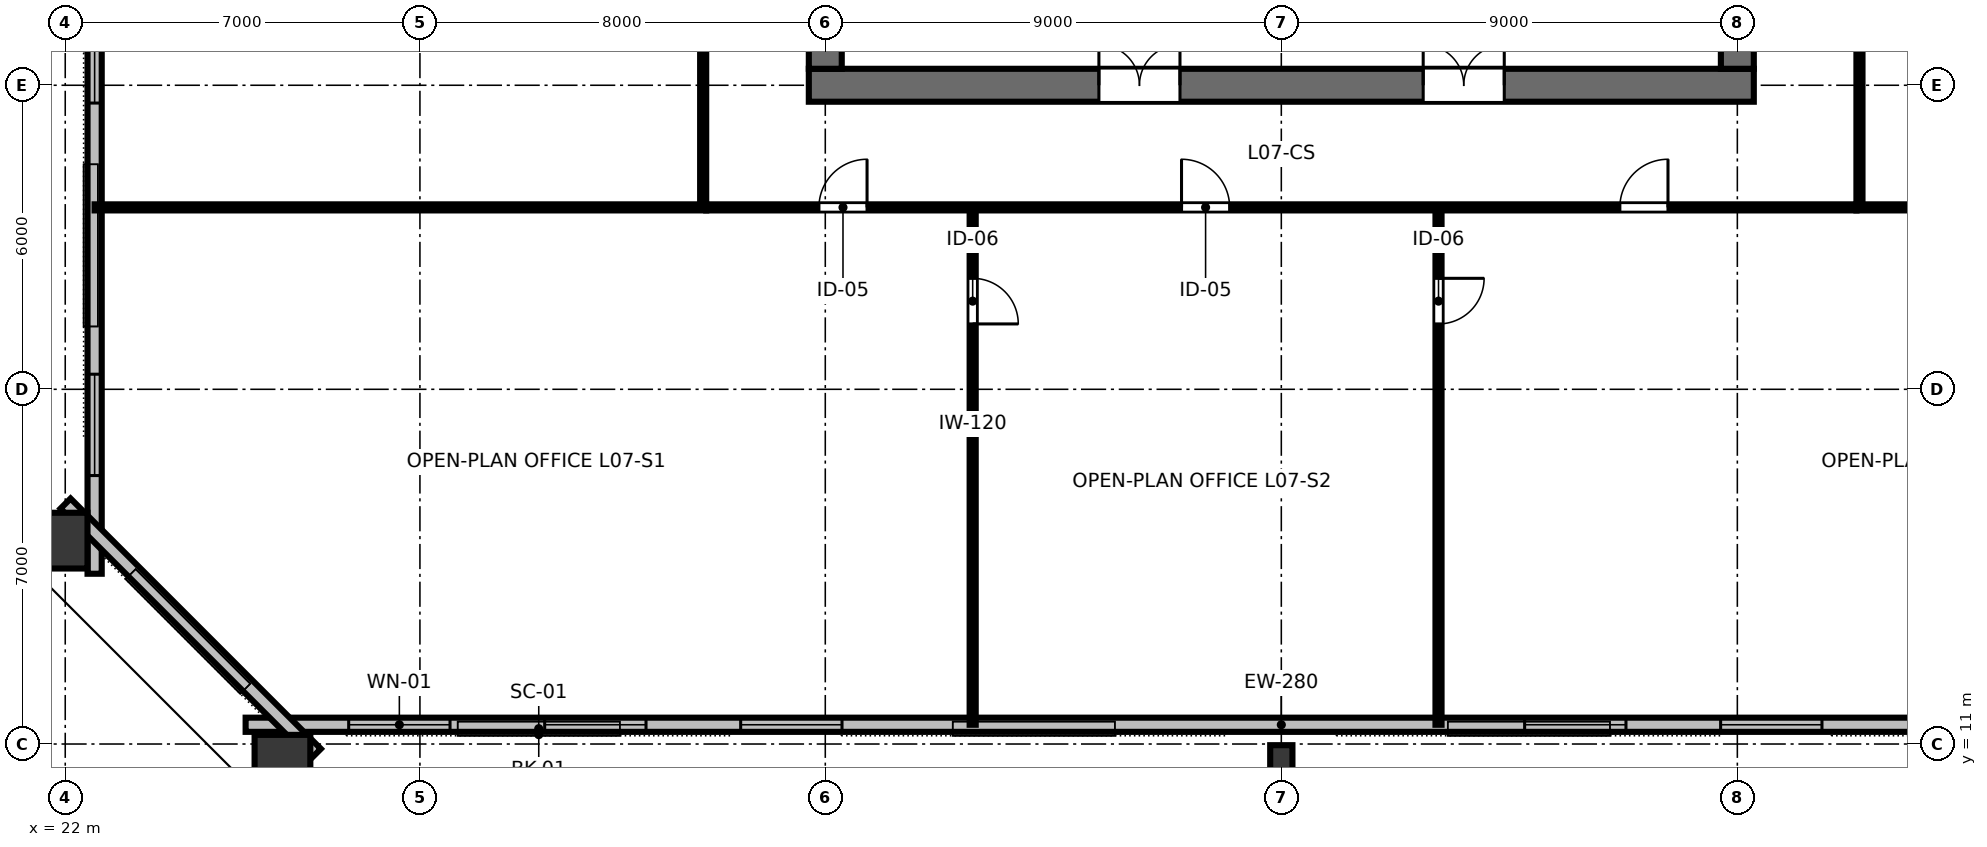
"""IFC4 building model, lengths in metres.
Left out: names, types, materials, properties, quantities, classifications, styles, units other than length and angle.
Written with IfcOpenShell. Run it as: python <this file> out.ifc"""

import sys

from ifc_helpers import new_model, si_unit, direction, frame, frame_2d, origin, origin_2d, place, context, subcontext, project, spatial, rectangle, hollow_rectangle, i_section, extrude, element, fill, save


model = new_model("IFC4")
c1 = context("Model", 3, precision=1e-05, world=origin(), true_north=direction((0.0, 1.0)))
c2 = subcontext(c1, "Body", "Model", "MODEL_VIEW")
j1 = project(units=[si_unit("LENGTHUNIT", "METRE"), si_unit("PLANEANGLEUNIT", "RADIAN")], contexts=[c1])
p1 = place(None, origin())
s1 = spatial("IfcSite", under=j1, at=p1, CompositionType="ELEMENT")
p2 = place(p1, origin())
s2 = spatial("IfcBuilding", under=s1, at=p2, CompositionType="ELEMENT")
p3 = place(p2, frame((0.0, 0.0, 31.6)))
s3 = spatial("IfcBuildingStorey", under=s2, at=p3, CompositionType="ELEMENT", Elevation=31.6)
p4 = place(p3, frame((36.675, 24.0, 0.0), z_axis=(0.0, 0.0, 1.0), x_axis=(1.0, 0.0, 0.0)))
e1 = element("IfcWall", 1, at=p4, inside=s3, PredefinedType="SHEAR", context=c2, shape_type="SweptSolid", body=[
    extrude(rectangle(XDim=18.65, YDim=0.65, at=frame_2d((9.325, 0.0))), origin(), (0.0, 0.0, 1.0), 3.36),
])
p5 = place(p4, frame((5.725, 0.0, 0.0)))
e2 = element("IfcOpeningElement", 2, at=p5, cuts=e1, PredefinedType="OPENING", context=c2, shape_type="SweptSolid", body=[
    extrude(rectangle(XDim=1.6, YDim=2.15, at=frame_2d((0.8, 1.075))), frame((0.0, 0.335, 0.0), z_axis=(0.0, -1.0, 0.0), x_axis=(1.0, 0.0, 0.0)), (0.0, 0.0, 1.0), 0.67),
])
p6 = place(p4, frame((12.125, 0.0, 0.0)))
e3 = element("IfcOpeningElement", 3, at=p6, cuts=e1, PredefinedType="OPENING", context=c2, shape_type="SweptSolid", body=[
    extrude(rectangle(XDim=1.6, YDim=2.15, at=frame_2d((0.8, 1.075))), frame((0.0, 0.335, 0.0), z_axis=(0.0, -1.0, 0.0), x_axis=(1.0, 0.0, 0.0)), (0.0, 0.0, 1.0), 0.67),
])
p7 = place(p3, frame((37.0, 24.325, 0.0), z_axis=(0.0, 0.0, 1.0), x_axis=(0.0, 1.0, 0.0)))
e4 = element("IfcWall", 4, at=p7, inside=s3, PredefinedType="SHEAR", context=c2, shape_type="SweptSolid", body=[
    extrude(rectangle(XDim=15.35, YDim=0.65, at=frame_2d((7.675, 0.0))), origin(), (0.0, 0.0, 1.0), 3.36),
])
p8 = place(p7, frame((5.2, 0.0, 0.0)))
e5 = element("IfcOpeningElement", 5, at=p8, cuts=e4, PredefinedType="OPENING", context=c2, shape_type="SweptSolid", body=[
    extrude(rectangle(XDim=1.15, YDim=2.15, at=frame_2d((0.575, 1.075))), frame((0.0, 0.335, 0.0), z_axis=(0.0, -1.0, 0.0), x_axis=(1.0, 0.0, 0.0)), (0.0, 0.0, 1.0), 0.67),
])
p9 = place(p3, frame((55.0, 24.325, 0.0), z_axis=(0.0, 0.0, 1.0), x_axis=(0.0, 1.0, 0.0)))
e6 = element("IfcWall", 6, at=p9, inside=s3, PredefinedType="SHEAR", context=c2, shape_type="SweptSolid", body=[
    extrude(rectangle(XDim=15.35, YDim=0.65, at=frame_2d((7.675, 0.0))), origin(), (0.0, 0.0, 1.0), 3.36),
])
p10 = place(p9, frame((5.2, 0.0, 0.0)))
e7 = element("IfcOpeningElement", 7, at=p10, cuts=e6, PredefinedType="OPENING", context=c2, shape_type="SweptSolid", body=[
    extrude(rectangle(XDim=1.15, YDim=2.15, at=frame_2d((0.575, 1.075))), frame((0.0, 0.335, 0.0), z_axis=(0.0, -1.0, 0.0), x_axis=(1.0, 0.0, 0.0)), (0.0, 0.0, 1.0), 0.67),
])
p11 = place(p3, frame((26.287, 10.531, 0.0), z_axis=(0.0, 0.0, 1.0), x_axis=(1.0, 0.0, 0.0)))
e8 = element("IfcColumn", 8, at=p11, inside=s3, PredefinedType="COLUMN", context=c2, shape_type="SweptSolid", body=[
    extrude(hollow_rectangle(XDim=1.1, YDim=1.3, WallThickness=0.07, at=origin_2d()), origin(), (0.0, 0.0, 1.0), 3.148),
])
p12 = place(p3, frame((46.0, 10.72, 0.0), z_axis=(0.0, 0.0, 1.0), x_axis=(1.0, 0.0, 0.0)))
e9 = element("IfcColumn", 9, at=p12, inside=s3, PredefinedType="COLUMN", context=c2, shape_type="SweptSolid", body=[
    extrude(i_section(OverallWidth=0.439, OverallDepth=0.514, WebThickness=0.06, FlangeThickness=0.097, FilletRadius=0.025, at=origin_2d()), origin(), (0.0, 0.0, 1.0), 3.148),
])
p13 = place(p3, frame((21.789, 15.013, 0.0), z_axis=(0.0, 0.0, 1.0), x_axis=(0.0, 1.0, 0.0)))
e10 = element("IfcColumn", 10, at=p13, inside=s3, PredefinedType="COLUMN", context=c2, shape_type="SweptSolid", body=[
    extrude(hollow_rectangle(XDim=1.1, YDim=1.3, WallThickness=0.07, at=origin_2d()), origin(), (0.0, 0.0, 1.0), 3.148),
])
p14 = place(p3, frame((25.56, 11.38, 0.0), z_axis=(0.0, 0.0, 1.0), x_axis=(1.0, 0.0, 0.0)))
e11 = element("IfcWall", 11, at=p14, inside=s3, PredefinedType="STANDARD", context=c2, shape_type="SweptSolid", body=[
    extrude(rectangle(XDim=40.88, YDim=0.28, at=frame_2d((20.44, 0.0))), origin(), (0.0, 0.0, 1.0), 3.15),
])
p15 = place(p14, frame((2.034, 0.0, 0.8)))
e12 = element("IfcOpeningElement", 12, at=p15, cuts=e11, PredefinedType="OPENING", context=c2, shape_type="SweptSolid", body=[
    extrude(rectangle(XDim=2.0, YDim=1.95, at=frame_2d((1.0, 0.975))), frame((0.0, 0.15, 0.0), z_axis=(0.0, -1.0, 0.0), x_axis=(1.0, 0.0, 0.0)), (0.0, 0.0, 1.0), 0.3),
])
p16 = place(p14, frame((5.902, 0.0, 0.8)))
e13 = element("IfcOpeningElement", 13, at=p16, cuts=e11, PredefinedType="OPENING", context=c2, shape_type="SweptSolid", body=[
    extrude(rectangle(XDim=2.0, YDim=1.95, at=frame_2d((1.0, 0.975))), frame((0.0, 0.15, 0.0), z_axis=(0.0, -1.0, 0.0), x_axis=(1.0, 0.0, 0.0)), (0.0, 0.0, 1.0), 0.3),
])
p17 = place(p14, frame((9.77, 0.0, 0.8)))
e14 = element("IfcOpeningElement", 14, at=p17, cuts=e11, PredefinedType="OPENING", context=c2, shape_type="SweptSolid", body=[
    extrude(rectangle(XDim=2.0, YDim=1.95, at=frame_2d((1.0, 0.975))), frame((0.0, 0.15, 0.0), z_axis=(0.0, -1.0, 0.0), x_axis=(1.0, 0.0, 0.0)), (0.0, 0.0, 1.0), 0.3),
])
p18 = place(p14, frame((25.242, 0.0, 0.8)))
e15 = element("IfcOpeningElement", 15, at=p18, cuts=e11, PredefinedType="OPENING", context=c2, shape_type="SweptSolid", body=[
    extrude(rectangle(XDim=2.0, YDim=1.95, at=frame_2d((1.0, 0.975))), frame((0.0, 0.15, 0.0), z_axis=(0.0, -1.0, 0.0), x_axis=(1.0, 0.0, 0.0)), (0.0, 0.0, 1.0), 0.3),
])
p19 = place(p14, frame((29.11, 0.0, 0.8)))
e16 = element("IfcOpeningElement", 16, at=p19, cuts=e11, PredefinedType="OPENING", context=c2, shape_type="SweptSolid", body=[
    extrude(rectangle(XDim=2.0, YDim=1.95, at=frame_2d((1.0, 0.975))), frame((0.0, 0.15, 0.0), z_axis=(0.0, -1.0, 0.0), x_axis=(1.0, 0.0, 0.0)), (0.0, 0.0, 1.0), 0.3),
])
p20 = place(p14, frame((32.978, 0.0, 0.8)))
e17 = element("IfcOpeningElement", 17, at=p20, cuts=e11, PredefinedType="OPENING", context=c2, shape_type="SweptSolid", body=[
    extrude(rectangle(XDim=2.0, YDim=1.95, at=frame_2d((1.0, 0.975))), frame((0.0, 0.15, 0.0), z_axis=(0.0, -1.0, 0.0), x_axis=(1.0, 0.0, 0.0)), (0.0, 0.0, 1.0), 0.3),
])
p21 = place(p14, frame((36.846, 0.0, 0.8)))
e18 = element("IfcOpeningElement", 18, at=p21, cuts=e11, PredefinedType="OPENING", context=c2, shape_type="SweptSolid", body=[
    extrude(rectangle(XDim=2.0, YDim=1.95, at=frame_2d((1.0, 0.975))), frame((0.0, 0.15, 0.0), z_axis=(0.0, -1.0, 0.0), x_axis=(1.0, 0.0, 0.0)), (0.0, 0.0, 1.0), 0.3),
])
p22 = place(p3, frame((22.58, 49.64, 0.0), z_axis=(0.0, 0.0, 1.0), x_axis=(0.0, -1.0, 0.0)))
e19 = element("IfcWall", 19, at=p22, inside=s3, PredefinedType="STANDARD", context=c2, shape_type="SweptSolid", body=[
    extrude(rectangle(XDim=35.28, YDim=0.28, at=frame_2d((17.64, 0.0))), origin(), (0.0, 0.0, 1.0), 3.15),
])
p23 = place(p22, frame((1.938, 0.0, 0.8)))
e20 = element("IfcOpeningElement", 20, at=p23, cuts=e19, PredefinedType="OPENING", context=c2, shape_type="SweptSolid", body=[
    extrude(rectangle(XDim=2.0, YDim=1.95, at=frame_2d((1.0, 0.975))), frame((0.0, 0.15, 0.0), z_axis=(0.0, -1.0, 0.0), x_axis=(1.0, 0.0, 0.0)), (0.0, 0.0, 1.0), 0.3),
])
p24 = place(p22, frame((9.289, 0.0, 0.8)))
e21 = element("IfcOpeningElement", 21, at=p24, cuts=e19, PredefinedType="OPENING", context=c2, shape_type="SweptSolid", body=[
    extrude(rectangle(XDim=2.0, YDim=1.95, at=frame_2d((1.0, 0.975))), frame((0.0, 0.15, 0.0), z_axis=(0.0, -1.0, 0.0), x_axis=(1.0, 0.0, 0.0)), (0.0, 0.0, 1.0), 0.3),
])
p25 = place(p22, frame((12.964, 0.0, 0.8)))
e22 = element("IfcOpeningElement", 22, at=p25, cuts=e19, PredefinedType="OPENING", context=c2, shape_type="SweptSolid", body=[
    extrude(rectangle(XDim=2.0, YDim=1.95, at=frame_2d((1.0, 0.975))), frame((0.0, 0.15, 0.0), z_axis=(0.0, -1.0, 0.0), x_axis=(1.0, 0.0, 0.0)), (0.0, 0.0, 1.0), 0.3),
])
p26 = place(p22, frame((23.991, 0.0, 0.8)))
e23 = element("IfcOpeningElement", 23, at=p26, cuts=e19, PredefinedType="OPENING", context=c2, shape_type="SweptSolid", body=[
    extrude(rectangle(XDim=2.0, YDim=1.95, at=frame_2d((1.0, 0.975))), frame((0.0, 0.15, 0.0), z_axis=(0.0, -1.0, 0.0), x_axis=(1.0, 0.0, 0.0)), (0.0, 0.0, 1.0), 0.3),
])
p27 = place(p22, frame((31.342, 0.0, 0.8)))
e24 = element("IfcOpeningElement", 24, at=p27, cuts=e19, PredefinedType="OPENING", context=c2, shape_type="SweptSolid", body=[
    extrude(rectangle(XDim=2.0, YDim=1.95, at=frame_2d((1.0, 0.975))), frame((0.0, 0.15, 0.0), z_axis=(0.0, -1.0, 0.0), x_axis=(1.0, 0.0, 0.0)), (0.0, 0.0, 1.0), 0.3),
])
p28 = place(p3, frame((22.006, 15.746, 0.0), z_axis=(0.0, 0.0, 1.0), x_axis=(0.707106781187, -0.707106781187, 0.0)))
e25 = element("IfcWall", 25, at=p28, inside=s3, PredefinedType="STANDARD", context=c2, shape_type="SweptSolid", body=[
    extrude(rectangle(XDim=6.985, YDim=0.28, at=frame_2d((3.493, 0.0))), origin(), (0.0, 0.0, 1.0), 3.15),
])
p29 = place(p3, frame((39.909, 21.59, 0.0), z_axis=(0.0, 0.0, 1.0), x_axis=(0.0, -1.0, 0.0)))
e26 = element("IfcWall", 26, at=p29, inside=s3, PredefinedType="PARTITIONING", context=c2, shape_type="SweptSolid", body=[
    extrude(rectangle(XDim=10.21, YDim=0.12, at=frame_2d((5.105, 0.0))), origin(), (0.0, 0.0, 1.0), 2.43),
])
p30 = place(p29, frame((1.4, 0.0, 0.0)))
e27 = element("IfcOpeningElement", 27, at=p30, cuts=e26, PredefinedType="OPENING", context=c2, shape_type="SweptSolid", body=[
    extrude(rectangle(XDim=0.9, YDim=2.15, at=frame_2d((0.45, 1.075))), frame((0.0, 0.07, 0.0), z_axis=(0.0, -1.0, 0.0), x_axis=(1.0, 0.0, 0.0)), (0.0, 0.0, 1.0), 0.14),
])
p31 = place(p3, frame((49.102, 21.59, 0.0), z_axis=(0.0, 0.0, 1.0), x_axis=(0.0, -1.0, 0.0)))
e28 = element("IfcWall", 28, at=p31, inside=s3, PredefinedType="PARTITIONING", context=c2, shape_type="SweptSolid", body=[
    extrude(rectangle(XDim=10.21, YDim=0.12, at=frame_2d((5.105, 0.0))), origin(), (0.0, 0.0, 1.0), 2.43),
])
p32 = place(p31, frame((1.4, 0.0, 0.0)))
e29 = element("IfcOpeningElement", 29, at=p32, cuts=e28, PredefinedType="OPENING", context=c2, shape_type="SweptSolid", body=[
    extrude(rectangle(XDim=0.9, YDim=2.15, at=frame_2d((0.45, 1.075))), frame((0.0, 0.07, 0.0), z_axis=(0.0, -1.0, 0.0), x_axis=(1.0, 0.0, 0.0)), (0.0, 0.0, 1.0), 0.14),
])
p33 = place(p3, frame((34.65, 21.59, 0.0), z_axis=(0.0, 0.0, 1.0), x_axis=(1.0, 0.0, 0.0)))
e30 = element("IfcWall", 30, at=p33, inside=s3, PredefinedType="PARTITIONING", context=c2, shape_type="SweptSolid", body=[
    extrude(rectangle(XDim=22.7, YDim=0.12, at=frame_2d((11.35, 0.0))), origin(), (0.0, 0.0, 1.0), 2.43),
])
p34 = place(p33, frame((2.224, 0.0, 0.0)))
e31 = element("IfcOpeningElement", 31, at=p34, cuts=e30, PredefinedType="OPENING", context=c2, shape_type="SweptSolid", body=[
    extrude(rectangle(XDim=0.95, YDim=2.15, at=frame_2d((0.475, 1.075))), frame((0.0, 0.07, 0.0), z_axis=(0.0, -1.0, 0.0), x_axis=(1.0, 0.0, 0.0)), (0.0, 0.0, 1.0), 0.14),
])
p35 = place(p33, frame((9.381, 0.0, 0.0)))
e32 = element("IfcOpeningElement", 32, at=p35, cuts=e30, PredefinedType="OPENING", context=c2, shape_type="SweptSolid", body=[
    extrude(rectangle(XDim=0.95, YDim=2.15, at=frame_2d((0.475, 1.075))), frame((0.0, 0.07, 0.0), z_axis=(0.0, -1.0, 0.0), x_axis=(1.0, 0.0, 0.0)), (0.0, 0.0, 1.0), 0.14),
])
p36 = place(p33, frame((18.031, 0.0, 0.0)))
e33 = element("IfcOpeningElement", 33, at=p36, cuts=e30, PredefinedType="OPENING", context=c2, shape_type="SweptSolid", body=[
    extrude(rectangle(XDim=0.95, YDim=2.15, at=frame_2d((0.475, 1.075))), frame((0.0, 0.07, 0.0), z_axis=(0.0, -1.0, 0.0), x_axis=(1.0, 0.0, 0.0)), (0.0, 0.0, 1.0), 0.14),
])
p37 = place(p3, frame((34.59, 21.65, 0.0), z_axis=(0.0, 0.0, 1.0), x_axis=(0.0, 1.0, 0.0)))
e34 = element("IfcWall", 34, at=p37, inside=s3, PredefinedType="PARTITIONING", context=c2, shape_type="SweptSolid", body=[
    extrude(rectangle(XDim=20.7, YDim=0.12, at=frame_2d((10.35, 0.0))), origin(), (0.0, 0.0, 1.0), 2.43),
])
p38 = place(p37, frame((3.161, 0.0, 0.0)))
e35 = element("IfcOpeningElement", 35, at=p38, cuts=e34, PredefinedType="OPENING", context=c2, shape_type="SweptSolid", body=[
    extrude(rectangle(XDim=0.95, YDim=2.15, at=frame_2d((0.475, 1.075))), frame((0.0, 0.07, 0.0), z_axis=(0.0, -1.0, 0.0), x_axis=(1.0, 0.0, 0.0)), (0.0, 0.0, 1.0), 0.14),
])
p39 = place(p37, frame((13.311, 0.0, 0.0)))
e36 = element("IfcOpeningElement", 36, at=p39, cuts=e34, PredefinedType="OPENING", context=c2, shape_type="SweptSolid", body=[
    extrude(rectangle(XDim=0.95, YDim=2.15, at=frame_2d((0.475, 1.075))), frame((0.0, 0.07, 0.0), z_axis=(0.0, -1.0, 0.0), x_axis=(1.0, 0.0, 0.0)), (0.0, 0.0, 1.0), 0.14),
])
p40 = place(p3, frame((57.41, 21.65, 0.0), z_axis=(0.0, 0.0, 1.0), x_axis=(0.0, 1.0, 0.0)))
e37 = element("IfcWall", 37, at=p40, inside=s3, PredefinedType="PARTITIONING", context=c2, shape_type="SweptSolid", body=[
    extrude(rectangle(XDim=20.7, YDim=0.12, at=frame_2d((10.35, 0.0))), origin(), (0.0, 0.0, 1.0), 2.43),
])
p41 = place(p40, frame((5.31, 0.0, 0.0)))
e38 = element("IfcOpeningElement", 38, at=p41, cuts=e37, PredefinedType="OPENING", context=c2, shape_type="SweptSolid", body=[
    extrude(rectangle(XDim=0.95, YDim=2.15, at=frame_2d((0.475, 1.075))), frame((0.0, 0.07, 0.0), z_axis=(0.0, -1.0, 0.0), x_axis=(1.0, 0.0, 0.0)), (0.0, 0.0, 1.0), 0.14),
])
p42 = place(p40, frame((15.459, 0.0, 0.0)))
e39 = element("IfcOpeningElement", 39, at=p42, cuts=e37, PredefinedType="OPENING", context=c2, shape_type="SweptSolid", body=[
    extrude(rectangle(XDim=0.95, YDim=2.15, at=frame_2d((0.475, 1.075))), frame((0.0, 0.07, 0.0), z_axis=(0.0, -1.0, 0.0), x_axis=(1.0, 0.0, 0.0)), (0.0, 0.0, 1.0), 0.14),
])
for number, where, z_axis, x_axis in (
    (40, (34.65, 21.59, 0.0), (0.0, 0.0, 1.0), (-1.0, 0.0, 0.0)),
    (41, (57.35, 21.59, 0.0), (0.0, 0.0, 1.0), (1.0, 0.0, 0.0)),
):
    element("IfcWall", number, at=place(p3, frame(where, z_axis=z_axis, x_axis=x_axis)), inside=s3, PredefinedType="PARTITIONING", context=c2, shape_type="SweptSolid", body=[
        extrude(rectangle(XDim=12.07, YDim=0.12, at=frame_2d((6.035, 0.0))), origin(), (0.0, 0.0, 1.0), 2.43),
    ])
p43 = place(p15, origin())
e42 = element("IfcWindow", 42, at=p43, inside=s3, PartitioningType="SINGLE_PANEL", PredefinedType="WINDOW", context=c2, shape_type="SweptSolid", body=[
    extrude(rectangle(XDim=2.0, YDim=1.95, at=frame_2d((1.0, 0.975))), frame((0.0, 0.03, 0.0), z_axis=(0.0, -1.0, 0.0), x_axis=(1.0, 0.0, 0.0)), (0.0, 0.0, 1.0), 0.06),
])
fill(e12, e42)
p44 = place(p16, origin())
e43 = element("IfcWindow", 43, at=p44, inside=s3, PartitioningType="SINGLE_PANEL", PredefinedType="WINDOW", context=c2, shape_type="SweptSolid", body=[
    extrude(rectangle(XDim=2.0, YDim=1.95, at=frame_2d((1.0, 0.975))), frame((0.0, 0.03, 0.0), z_axis=(0.0, -1.0, 0.0), x_axis=(1.0, 0.0, 0.0)), (0.0, 0.0, 1.0), 0.06),
])
fill(e13, e43)
p45 = place(p17, origin())
e44 = element("IfcWindow", 44, at=p45, inside=s3, PartitioningType="SINGLE_PANEL", PredefinedType="WINDOW", context=c2, shape_type="SweptSolid", body=[
    extrude(rectangle(XDim=2.0, YDim=1.95, at=frame_2d((1.0, 0.975))), frame((0.0, 0.03, 0.0), z_axis=(0.0, -1.0, 0.0), x_axis=(1.0, 0.0, 0.0)), (0.0, 0.0, 1.0), 0.06),
])
fill(e14, e44)
p46 = place(p18, origin())
e45 = element("IfcWindow", 45, at=p46, inside=s3, PartitioningType="SINGLE_PANEL", PredefinedType="WINDOW", context=c2, shape_type="SweptSolid", body=[
    extrude(rectangle(XDim=2.0, YDim=1.95, at=frame_2d((1.0, 0.975))), frame((0.0, 0.03, 0.0), z_axis=(0.0, -1.0, 0.0), x_axis=(1.0, 0.0, 0.0)), (0.0, 0.0, 1.0), 0.06),
])
fill(e15, e45)
p47 = place(p19, origin())
e46 = element("IfcWindow", 46, at=p47, inside=s3, PartitioningType="SINGLE_PANEL", PredefinedType="WINDOW", context=c2, shape_type="SweptSolid", body=[
    extrude(rectangle(XDim=2.0, YDim=1.95, at=frame_2d((1.0, 0.975))), frame((0.0, 0.03, 0.0), z_axis=(0.0, -1.0, 0.0), x_axis=(1.0, 0.0, 0.0)), (0.0, 0.0, 1.0), 0.06),
])
fill(e16, e46)
p48 = place(p26, origin())
e47 = element("IfcWindow", 47, at=p48, inside=s3, PartitioningType="SINGLE_PANEL", PredefinedType="WINDOW", context=c2, shape_type="SweptSolid", body=[
    extrude(rectangle(XDim=2.0, YDim=1.95, at=frame_2d((1.0, 0.975))), frame((0.0, 0.03, 0.0), z_axis=(0.0, -1.0, 0.0), x_axis=(1.0, 0.0, 0.0)), (0.0, 0.0, 1.0), 0.06),
])
fill(e23, e47)
p49 = place(p27, origin())
e48 = element("IfcWindow", 48, at=p49, inside=s3, PartitioningType="SINGLE_PANEL", PredefinedType="WINDOW", context=c2, shape_type="SweptSolid", body=[
    extrude(rectangle(XDim=2.0, YDim=1.95, at=frame_2d((1.0, 0.975))), frame((0.0, 0.03, 0.0), z_axis=(0.0, -1.0, 0.0), x_axis=(1.0, 0.0, 0.0)), (0.0, 0.0, 1.0), 0.06),
])
fill(e24, e48)
p50 = place(p5, origin())
e49 = element("IfcDoor", 49, at=p50, inside=s3, OperationType="DOUBLE_DOOR_SINGLE_SWING", PredefinedType="DOOR", context=c2, shape_type="SweptSolid", body=[
    extrude(rectangle(XDim=1.6, YDim=2.15, at=frame_2d((0.8, 1.075))), frame((0.0, 0.025, 0.0), z_axis=(0.0, -1.0, 0.0), x_axis=(1.0, 0.0, 0.0)), (0.0, 0.0, 1.0), 0.05),
])
fill(e2, e49)
p51 = place(p6, origin())
e50 = element("IfcDoor", 50, at=p51, inside=s3, OperationType="DOUBLE_DOOR_SINGLE_SWING", PredefinedType="DOOR", context=c2, shape_type="SweptSolid", body=[
    extrude(rectangle(XDim=1.6, YDim=2.15, at=frame_2d((0.8, 1.075))), frame((0.0, 0.025, 0.0), z_axis=(0.0, -1.0, 0.0), x_axis=(1.0, 0.0, 0.0)), (0.0, 0.0, 1.0), 0.05),
])
fill(e3, e50)
p52 = place(p30, origin())
e51 = element("IfcDoor", 51, at=p52, inside=s3, OperationType="SINGLE_SWING_RIGHT", PredefinedType="DOOR", context=c2, shape_type="SweptSolid", body=[
    extrude(rectangle(XDim=0.9, YDim=2.15, at=frame_2d((0.45, 1.075))), frame((0.0, 0.025, 0.0), z_axis=(0.0, -1.0, 0.0), x_axis=(1.0, 0.0, 0.0)), (0.0, 0.0, 1.0), 0.05),
])
fill(e27, e51)
p53 = place(p32, origin())
e52 = element("IfcDoor", 52, at=p53, inside=s3, OperationType="SINGLE_SWING_LEFT", PredefinedType="DOOR", context=c2, shape_type="SweptSolid", body=[
    extrude(rectangle(XDim=0.9, YDim=2.15, at=frame_2d((0.45, 1.075))), frame((0.0, 0.025, 0.0), z_axis=(0.0, -1.0, 0.0), x_axis=(1.0, 0.0, 0.0)), (0.0, 0.0, 1.0), 0.05),
])
fill(e29, e52)
p54 = place(p34, origin())
e53 = element("IfcDoor", 53, at=p54, inside=s3, OperationType="SINGLE_SWING_RIGHT", PredefinedType="DOOR", context=c2, shape_type="SweptSolid", body=[
    extrude(rectangle(XDim=0.95, YDim=2.15, at=frame_2d((0.475, 1.075))), frame((0.0, 0.025, 0.0), z_axis=(0.0, -1.0, 0.0), x_axis=(1.0, 0.0, 0.0)), (0.0, 0.0, 1.0), 0.05),
])
fill(e31, e53)
p55 = place(p35, origin())
e54 = element("IfcDoor", 54, at=p55, inside=s3, OperationType="SINGLE_SWING_LEFT", PredefinedType="DOOR", context=c2, shape_type="SweptSolid", body=[
    extrude(rectangle(XDim=0.95, YDim=2.15, at=frame_2d((0.475, 1.075))), frame((0.0, 0.025, 0.0), z_axis=(0.0, -1.0, 0.0), x_axis=(1.0, 0.0, 0.0)), (0.0, 0.0, 1.0), 0.05),
])
fill(e32, e54)
p56 = place(p36, origin())
e55 = element("IfcDoor", 55, at=p56, inside=s3, OperationType="SINGLE_SWING_RIGHT", PredefinedType="DOOR", context=c2, shape_type="SweptSolid", body=[
    extrude(rectangle(XDim=0.95, YDim=2.15, at=frame_2d((0.475, 1.075))), frame((0.0, 0.025, 0.0), z_axis=(0.0, -1.0, 0.0), x_axis=(1.0, 0.0, 0.0)), (0.0, 0.0, 1.0), 0.05),
])
fill(e33, e55)
save(model, sys.argv[1])
